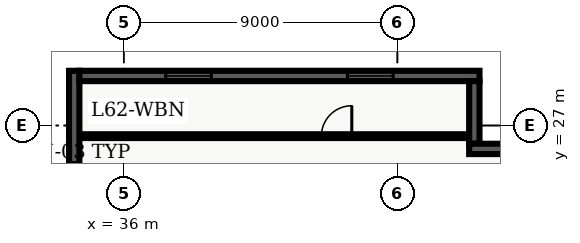
"""IFC4 building model, lengths in metres.
Left out: names, types, materials, properties, quantities, classifications, styles, units other than length and angle.
Written with IfcOpenShell. Run it as: python <this file> out.ifc"""

import sys

from ifc_helpers import new_model, entity, si_unit, converted_unit, direction, frame, origin_with_axes, origin_2d_with_axis, place, context, subcontext, project, spatial, polyline, rectangle, outline, extrude, element, fill, save


model = new_model("IFC4")
c1 = context("Model", 3, precision=1e-05, world=origin_with_axes(), true_north=direction((0.0, 1.0)))
c2 = subcontext(c1, "Body", "Model", "MODEL_VIEW")
j1 = project(units=[si_unit("LENGTHUNIT", "METRE"), converted_unit("PLANEANGLEUNIT", "DEGREE", entity("IfcPlaneAngleMeasure", 0.017), si_unit("PLANEANGLEUNIT", "RADIAN"), dimensions=[0, 0, 0, 0, 0, 0, 0])], contexts=[c1])
p1 = place(None, origin_with_axes())
s1 = spatial("IfcSite", under=j1, at=p1, CompositionType="ELEMENT")
p2 = place(p1, origin_with_axes())
s2 = spatial("IfcBuilding", under=s1, at=p2, CompositionType="ELEMENT")
p3 = place(p2, frame((0.0, 0.0, 252.9), z_axis=(0.0, 0.0, 1.0), x_axis=(1.0, 0.0, 0.0)))
s3 = spatial("IfcBuildingStorey", under=s2, at=p3, CompositionType="ELEMENT", Elevation=252.9)
p4 = place(p3, frame((34.535, 26.65, 0.0), z_axis=(0.0, 0.0, 1.0), x_axis=(1.0, 0.0, 0.0)))
e1 = element("IfcWall", 1, at=p4, inside=s3, PredefinedType="PARTITIONING", context=c2, shape_type="SweptSolid", body=[
    extrude(outline(polyline([(0.0, -0.062), (12.995, -0.062), (12.995, 0.062), (0.0, 0.062), (0.0, -0.062)])), origin_with_axes(), (0.0, 0.0, 1.0), 2.7),
])
p5 = place(p4, frame((8.465, 0.0, 0.0), z_axis=(0.0, 0.0, 1.0), x_axis=(1.0, 0.0, 0.0)))
e2 = element("IfcOpeningElement", 2, at=p5, cuts=e1, PredefinedType="OPENING", context=c2, shape_type="SweptSolid", body=[
    extrude(rectangle(XDim=1.0, YDim=0.145, at=origin_2d_with_axis()), origin_with_axes(), (0.0, 0.0, 1.0), 2.15),
])
p6 = place(p3, frame((34.37, 21.26, 0.0), z_axis=(0.0, 0.0, 1.0), x_axis=(0.0, 1.0, 0.0)))
e3 = element("IfcWall", 3, at=p6, inside=s3, PredefinedType="SOLIDWALL", context=c2, shape_type="SweptSolid", body=[
    extrude(outline(polyline([(0.0, -0.17), (7.54, -0.17), (7.54, 0.17), (0.0, 0.17), (0.0, -0.17)])), origin_with_axes(), (0.0, 0.0, 1.0), 3.66),
])
p7 = place(p6, frame((3.77, 0.0, 0.45), z_axis=(0.0, 0.0, 1.0), x_axis=(1.0, 0.0, 0.0)))
e4 = element("IfcOpeningElement", 4, at=p7, cuts=e3, PredefinedType="OPENING", context=c2, shape_type="SweptSolid", body=[
    extrude(rectangle(XDim=1.5, YDim=0.36, at=origin_2d_with_axis()), origin_with_axes(), (0.0, 0.0, 1.0), 2.1),
])
p8 = place(p3, frame((34.54, 28.63, 0.0), z_axis=(0.0, 0.0, 1.0), x_axis=(1.0, 0.0, 0.0)))
e5 = element("IfcWall", 5, at=p8, inside=s3, PredefinedType="SOLIDWALL", context=c2, shape_type="SweptSolid", body=[
    extrude(outline(polyline([(0.0, -0.17), (13.16, -0.17), (13.16, 0.17), (0.0, 0.17), (0.0, -0.17)])), origin_with_axes(), (0.0, 0.0, 1.0), 3.66),
])
p9 = place(p8, frame((3.59, 0.0, 0.45), z_axis=(0.0, 0.0, 1.0), x_axis=(1.0, 0.0, 0.0)))
e6 = element("IfcOpeningElement", 6, at=p9, cuts=e5, PredefinedType="OPENING", context=c2, shape_type="SweptSolid", body=[
    extrude(rectangle(XDim=1.5, YDim=0.36, at=origin_2d_with_axis()), origin_with_axes(), (0.0, 0.0, 1.0), 2.1),
])
p10 = place(p8, frame((9.57, 0.0, 0.45), z_axis=(0.0, 0.0, 1.0), x_axis=(1.0, 0.0, 0.0)))
e7 = element("IfcOpeningElement", 7, at=p10, cuts=e5, PredefinedType="OPENING", context=c2, shape_type="SweptSolid", body=[
    extrude(rectangle(XDim=1.5, YDim=0.36, at=origin_2d_with_axis()), origin_with_axes(), (0.0, 0.0, 1.0), 2.1),
])
p11 = place(p3, frame((47.53, 28.46, 0.0), z_axis=(0.0, 0.0, 1.0), x_axis=(0.0, -1.0, 0.0)))
e8 = element("IfcWall", 8, at=p11, inside=s3, PredefinedType="SOLIDWALL", context=c2, shape_type="SweptSolid", body=[
    extrude(outline(polyline([(0.0, -0.17), (2.06, -0.17), (2.06, 0.17), (0.0, 0.17), (0.0, -0.17)])), origin_with_axes(), (0.0, 0.0, 1.0), 3.66),
])
p12 = place(p3, frame((47.36, 26.23, 0.0), z_axis=(0.0, 0.0, 1.0), x_axis=(1.0, 0.0, 0.0)))
e9 = element("IfcWall", 9, at=p12, inside=s3, PredefinedType="SOLIDWALL", context=c2, shape_type="SweptSolid", body=[
    extrude(outline(polyline([(0.0, -0.17), (2.74, -0.17), (2.74, 0.17), (0.0, 0.17), (0.0, -0.17)])), origin_with_axes(), (0.0, 0.0, 1.0), 3.66),
])
p13 = place(p4, frame((8.465, 0.0, 0.0), z_axis=(0.0, 0.0, 1.0), x_axis=(1.0, 0.0, 0.0)))
e10 = element("IfcDoor", 10, at=p13, inside=s3, OperationType="SINGLE_SWING_RIGHT", PredefinedType="DOOR", context=c2, shape_type="SweptSolid", body=[
    extrude(rectangle(XDim=1.0, YDim=0.075, at=origin_2d_with_axis()), origin_with_axes(), (0.0, 0.0, 1.0), 2.15),
])
fill(e2, e10)
p14 = place(p8, frame((3.59, 0.0, 0.45), z_axis=(0.0, 0.0, 1.0), x_axis=(1.0, 0.0, 0.0)))
e11 = element("IfcWindow", 11, at=p14, inside=s3, PredefinedType="WINDOW", context=c2, shape_type="SweptSolid", body=[
    extrude(rectangle(XDim=1.5, YDim=0.09, at=origin_2d_with_axis()), origin_with_axes(), (0.0, 0.0, 1.0), 2.1),
])
fill(e6, e11)
p15 = place(p8, frame((9.57, 0.0, 0.45), z_axis=(0.0, 0.0, 1.0), x_axis=(1.0, 0.0, 0.0)))
e12 = element("IfcWindow", 12, at=p15, inside=s3, PredefinedType="WINDOW", context=c2, shape_type="SweptSolid", body=[
    extrude(rectangle(XDim=1.5, YDim=0.09, at=origin_2d_with_axis()), origin_with_axes(), (0.0, 0.0, 1.0), 2.1),
])
fill(e7, e12)
save(model, sys.argv[1])
